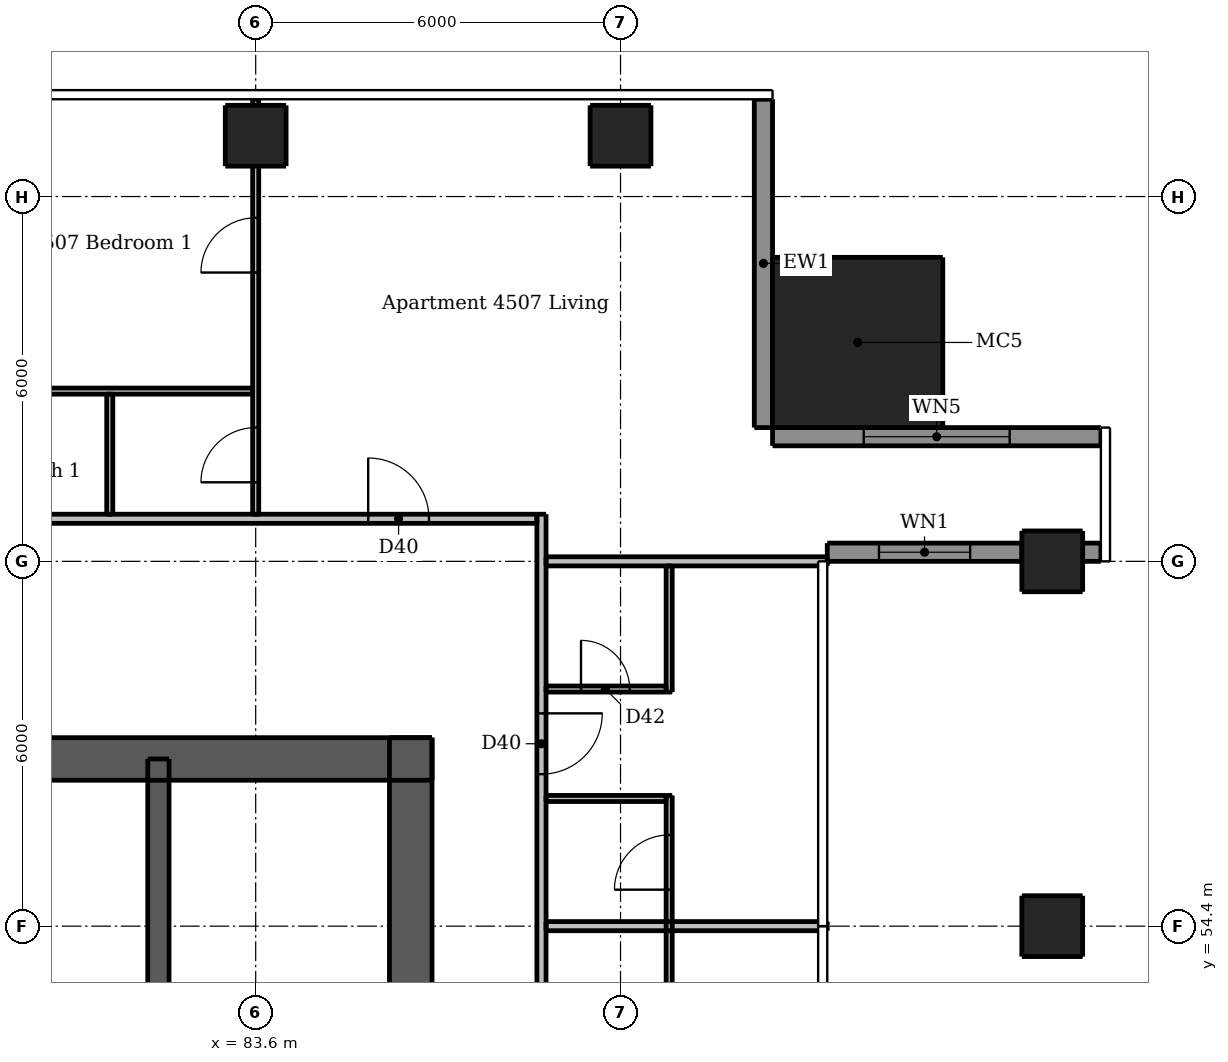
"""IFC4 building model, lengths in metres.
Left out: names, types, materials, properties, quantities, classifications, styles, units other than length and angle.
Written with IfcOpenShell. Run it as: python <this file> out.ifc"""

import sys

from ifc_helpers import new_model, si_unit, direction, frame, frame_2d, origin, origin_2d, place, context, subcontext, project, spatial, rectangle, extrude, element, fill, save


model = new_model("IFC4")
c1 = context("Model", 3, precision=1e-05, world=origin(), true_north=direction((0.0, 1.0)))
c2 = subcontext(c1, "Body", "Model", "MODEL_VIEW")
j1 = project(units=[si_unit("LENGTHUNIT", "METRE"), si_unit("PLANEANGLEUNIT", "RADIAN")], contexts=[c1])
p1 = place(None, origin())
s1 = spatial("IfcSite", under=j1, at=p1, CompositionType="ELEMENT")
p2 = place(p1, origin())
s2 = spatial("IfcBuilding", under=s1, at=p2, CompositionType="ELEMENT")
p3 = place(p2, frame((0.0, 0.0, 168.1)))
s3 = spatial("IfcBuildingStorey", under=s2, at=p3, CompositionType="ELEMENT", Elevation=168.1)
p4 = place(p3, frame((62.5, 57.15, 0.0), z_axis=(0.0, 0.0, 1.0), x_axis=(1.0, 0.0, 0.0)))
e1 = element("IfcWall", 1, at=p4, inside=s3, PredefinedType="SHEAR", context=c2, shape_type="SweptSolid", body=[
    extrude(rectangle(XDim=24.0, YDim=0.7, at=frame_2d((12.0, 0.0))), origin(), (0.0, 0.0, 1.0), 3.05),
])
p5 = place(p4, frame((20.938, 0.0, 0.0)))
e2 = element("IfcOpeningElement", 2, at=p5, cuts=e1, PredefinedType="OPENING", context=c2, shape_type="SweptSolid", body=[
    extrude(rectangle(XDim=1.1, YDim=2.1, at=frame_2d((0.55, 1.05))), frame((0.0, 0.36, 0.0), z_axis=(0.0, -1.0, 0.0), x_axis=(1.0, 0.0, 0.0)), (0.0, 0.0, 1.0), 0.72),
])
p6 = place(p4, frame((1.962, 0.0, 0.0)))
e3 = element("IfcOpeningElement", 3, at=p6, cuts=e1, PredefinedType="OPENING", context=c2, shape_type="SweptSolid", body=[
    extrude(rectangle(XDim=1.1, YDim=2.1, at=frame_2d((0.55, 1.05))), frame((0.0, 0.36, 0.0), z_axis=(0.0, -1.0, 0.0), x_axis=(1.0, 0.0, 0.0)), (0.0, 0.0, 1.0), 0.72),
])
p7 = place(p4, frame((6.423, 0.0, 0.0)))
e4 = element("IfcOpeningElement", 4, at=p7, cuts=e1, PredefinedType="OPENING", context=c2, shape_type="SweptSolid", body=[
    extrude(rectangle(XDim=0.9, YDim=2.1, at=frame_2d((0.45, 1.05))), frame((0.0, 0.36, 0.0), z_axis=(0.0, -1.0, 0.0), x_axis=(1.0, 0.0, 0.0)), (0.0, 0.0, 1.0), 0.72),
])
p8 = place(p4, frame((13.748, 0.0, 0.0)))
e5 = element("IfcOpeningElement", 5, at=p8, cuts=e1, PredefinedType="OPENING", context=c2, shape_type="SweptSolid", body=[
    extrude(rectangle(XDim=0.9, YDim=2.1, at=frame_2d((0.45, 1.05))), frame((0.0, 0.36, 0.0), z_axis=(0.0, -1.0, 0.0), x_axis=(1.0, 0.0, 0.0)), (0.0, 0.0, 1.0), 0.72),
])
p9 = place(p3, frame((86.15, 33.5, 0.0), z_axis=(0.0, 0.0, 1.0), x_axis=(0.0, 1.0, 0.0)))
e6 = element("IfcWall", 6, at=p9, inside=s3, PredefinedType="SHEAR", context=c2, shape_type="SweptSolid", body=[
    extrude(rectangle(XDim=24.0, YDim=0.7, at=frame_2d((12.0, 0.0))), origin(), (0.0, 0.0, 1.0), 3.05),
])
p10 = place(p9, frame((11.2, 0.0, 0.0)))
e7 = element("IfcOpeningElement", 7, at=p10, cuts=e6, PredefinedType="OPENING", context=c2, shape_type="SweptSolid", body=[
    extrude(rectangle(XDim=1.6, YDim=2.1, at=frame_2d((0.8, 1.05))), frame((0.0, 0.36, 0.0), z_axis=(0.0, -1.0, 0.0), x_axis=(1.0, 0.0, 0.0)), (0.0, 0.0, 1.0), 0.72),
])
p11 = place(p3, frame((82.0, 47.1, 0.0), z_axis=(0.0, 0.0, 1.0), x_axis=(0.0, 1.0, 0.0)))
e8 = element("IfcWall", 8, at=p11, inside=s3, PredefinedType="SHEAR", context=c2, shape_type="SweptSolid", body=[
    extrude(rectangle(XDim=10.05, YDim=0.35, at=frame_2d((5.025, 0.0))), origin(), (0.0, 0.0, 1.0), 3.05),
])
for number, where, z_axis, x_axis in (
    (9, (96.7, 54.4, 0.0), (0.0, 0.0, 1.0), (1.0, 0.0, 0.0)),
    (10, (96.7, 60.4, 0.0), (0.0, 0.0, 1.0), (1.0, 0.0, 0.0)),
    (11, (83.6, 67.4, 0.0), (0.0, 0.0, 1.0), (1.0, 0.0, 0.0)),
    (12, (89.6, 67.4, 0.0), (0.0, 0.0, 1.0), (1.0, 0.0, 0.0)),
):
    element("IfcColumn", number, at=place(p3, frame(where, z_axis=z_axis, x_axis=x_axis)), inside=s3, PredefinedType="COLUMN", context=c2, shape_type="SweptSolid", body=[
        extrude(rectangle(XDim=1.0, YDim=1.0, at=origin_2d()), origin(), (0.0, 0.0, 1.0), 3.05),
    ])
p12 = place(p3, frame((93.5, 64.0, 0.0), z_axis=(0.0, 0.0, 1.0), x_axis=(1.0, 0.0, 0.0)))
e13 = element("IfcColumn", 13, at=p12, inside=s3, PredefinedType="COLUMN", context=c2, shape_type="SweptSolid", body=[
    extrude(rectangle(XDim=2.8, YDim=2.8, at=origin_2d()), origin(), (0.0, 0.0, 1.0), 3.3),
])
p13 = place(p3, frame((93.0, 60.55, 0.0), z_axis=(0.0, 0.0, 1.0), x_axis=(1.0, 0.0, 0.0)))
e14 = element("IfcWall", 14, at=p13, inside=s3, PredefinedType="SOLIDWALL", context=c2, shape_type="SweptSolid", body=[
    extrude(rectangle(XDim=3.2, YDim=0.3, at=frame_2d((1.6, 0.0))), origin(), (0.0, 0.0, 1.0), 3.05),
])
p14 = place(p13, frame((0.85, 0.0, 0.9)))
e15 = element("IfcOpeningElement", 15, at=p14, cuts=e14, PredefinedType="OPENING", context=c2, shape_type="SweptSolid", body=[
    extrude(rectangle(XDim=1.5, YDim=1.5, at=frame_2d((0.75, 0.75))), frame((0.0, 0.16, 0.0), z_axis=(0.0, -1.0, 0.0), x_axis=(1.0, 0.0, 0.0)), (0.0, 0.0, 1.0), 0.32),
])
p15 = place(p3, frame((97.2, 60.55, 0.0), z_axis=(0.0, 0.0, 1.0), x_axis=(1.0, 0.0, 0.0)))
e16 = element("IfcWall", 16, at=p15, inside=s3, PredefinedType="SOLIDWALL", context=c2, shape_type="SweptSolid", body=[
    extrude(rectangle(XDim=0.3, YDim=0.3, at=frame_2d((0.15, 0.0))), origin(), (0.0, 0.0, 1.0), 3.05),
])
p16 = place(p3, frame((97.5, 62.45, 0.0), z_axis=(0.0, 0.0, 1.0), x_axis=(-1.0, 0.0, 0.0)))
e17 = element("IfcWall", 17, at=p16, inside=s3, PredefinedType="SOLIDWALL", context=c2, shape_type="SweptSolid", body=[
    extrude(rectangle(XDim=5.4, YDim=0.3, at=frame_2d((2.7, 0.0))), origin(), (0.0, 0.0, 1.0), 3.05),
])
p17 = place(p16, frame((1.5, 0.0, 0.15)))
e18 = element("IfcOpeningElement", 18, at=p17, cuts=e17, PredefinedType="OPENING", context=c2, shape_type="SweptSolid", body=[
    extrude(rectangle(XDim=2.4, YDim=2.1, at=frame_2d((1.2, 1.05))), frame((0.0, 0.16, 0.0), z_axis=(0.0, -1.0, 0.0), x_axis=(1.0, 0.0, 0.0)), (0.0, 0.0, 1.0), 0.32),
])
p18 = place(p3, frame((91.95, 62.6, 0.0), z_axis=(0.0, 0.0, 1.0), x_axis=(0.0, 1.0, 0.0)))
e19 = element("IfcWall", 19, at=p18, inside=s3, PredefinedType="SOLIDWALL", context=c2, shape_type="SweptSolid", body=[
    extrude(rectangle(XDim=5.4, YDim=0.3, at=frame_2d((2.7, 0.0))), origin(), (0.0, 0.0, 1.0), 3.05),
])
p19 = place(p3, frame((81.2, 61.175, 0.0), z_axis=(0.0, 0.0, 1.0), x_axis=(0.0, 1.0, 0.0)))
e20 = element("IfcWall", 20, at=p19, inside=s3, PredefinedType="PARTITIONING", context=c2, shape_type="SweptSolid", body=[
    extrude(rectangle(XDim=1.975, YDim=0.1, at=frame_2d((0.987, 0.0))), origin(), (0.0, 0.0, 1.0), 3.05),
])
p20 = place(p3, frame((83.6, 61.175, 0.0), z_axis=(0.0, 0.0, 1.0), x_axis=(0.0, 1.0, 0.0)))
e21 = element("IfcWall", 21, at=p20, inside=s3, PredefinedType="PARTITIONING", context=c2, shape_type="SweptSolid", body=[
    extrude(rectangle(XDim=6.825, YDim=0.1, at=frame_2d((3.413, 0.0))), origin(), (0.0, 0.0, 1.0), 2.516),
])
p21 = place(p20, frame((0.525, 0.0, 0.0)))
e22 = element("IfcOpeningElement", 22, at=p21, cuts=e21, PredefinedType="OPENING", context=c2, shape_type="SweptSolid", body=[
    extrude(rectangle(XDim=0.9, YDim=2.1, at=frame_2d((0.45, 1.05))), frame((0.0, 0.06, 0.0), z_axis=(0.0, -1.0, 0.0), x_axis=(1.0, 0.0, 0.0)), (0.0, 0.0, 1.0), 0.12),
])
p22 = place(p20, frame((3.975, 0.0, 0.0)))
e23 = element("IfcOpeningElement", 23, at=p22, cuts=e21, PredefinedType="OPENING", context=c2, shape_type="SweptSolid", body=[
    extrude(rectangle(XDim=0.9, YDim=2.1, at=frame_2d((0.45, 1.05))), frame((0.0, 0.06, 0.0), z_axis=(0.0, -1.0, 0.0), x_axis=(1.0, 0.0, 0.0)), (0.0, 0.0, 1.0), 0.12),
])
p23 = place(p3, frame((90.4, 51.45, 0.0), z_axis=(0.0, 0.0, 1.0), x_axis=(0.0, 1.0, 0.0)))
e24 = element("IfcWall", 24, at=p23, inside=s3, PredefinedType="PARTITIONING", context=c2, shape_type="SweptSolid", body=[
    extrude(rectangle(XDim=5.1, YDim=0.1, at=frame_2d((2.55, 0.0))), origin(), (0.0, 0.0, 1.0), 3.05),
])
p24 = place(p23, frame((3.55, 0.0, 0.0)))
e25 = element("IfcOpeningElement", 25, at=p24, cuts=e24, PredefinedType="OPENING", context=c2, shape_type="SweptSolid", body=[
    extrude(rectangle(XDim=0.9, YDim=2.1, at=frame_2d((0.45, 1.05))), frame((0.0, 0.06, 0.0), z_axis=(0.0, -1.0, 0.0), x_axis=(1.0, 0.0, 0.0)), (0.0, 0.0, 1.0), 0.12),
])
p25 = place(p3, frame((90.4, 58.25, 0.0), z_axis=(0.0, 0.0, 1.0), x_axis=(0.0, 1.0, 0.0)))
e26 = element("IfcWall", 26, at=p25, inside=s3, PredefinedType="PARTITIONING", context=c2, shape_type="SweptSolid", body=[
    extrude(rectangle(XDim=2.075, YDim=0.1, at=frame_2d((1.038, 0.0))), origin(), (0.0, 0.0, 1.0), 3.05),
])
p26 = place(p3, frame((83.55, 63.2, 0.0), z_axis=(0.0, 0.0, 1.0), x_axis=(-1.0, 0.0, 0.0)))
e27 = element("IfcWall", 27, at=p26, inside=s3, PredefinedType="PARTITIONING", context=c2, shape_type="SweptSolid", body=[
    extrude(rectangle(XDim=5.875, YDim=0.1, at=frame_2d((2.938, 0.0))), origin(), (0.0, 0.0, 1.0), 3.05),
])
p27 = place(p26, frame((3.75, 0.0, 0.0)))
e28 = element("IfcOpeningElement", 28, at=p27, cuts=e27, PredefinedType="OPENING", context=c2, shape_type="SweptSolid", body=[
    extrude(rectangle(XDim=0.8, YDim=2.1, at=frame_2d((0.4, 1.05))), frame((0.0, 0.06, 0.0), z_axis=(0.0, -1.0, 0.0), x_axis=(1.0, 0.0, 0.0)), (0.0, 0.0, 1.0), 0.12),
])
p28 = place(p3, frame((88.375, 58.3, 0.0), z_axis=(0.0, 0.0, 1.0), x_axis=(1.0, 0.0, 0.0)))
e29 = element("IfcWall", 29, at=p28, inside=s3, PredefinedType="PARTITIONING", context=c2, shape_type="SweptSolid", body=[
    extrude(rectangle(XDim=1.975, YDim=0.1, at=frame_2d((0.988, 0.0))), origin(), (0.0, 0.0, 1.0), 3.05),
])
p29 = place(p28, frame((0.575, 0.0, 0.0)))
e30 = element("IfcOpeningElement", 30, at=p29, cuts=e29, PredefinedType="OPENING", context=c2, shape_type="SweptSolid", body=[
    extrude(rectangle(XDim=0.8, YDim=2.1, at=frame_2d((0.4, 1.05))), frame((0.0, 0.06, 0.0), z_axis=(0.0, -1.0, 0.0), x_axis=(1.0, 0.0, 0.0)), (0.0, 0.0, 1.0), 0.12),
])
p30 = place(p3, frame((88.375, 56.5, 0.0), z_axis=(0.0, 0.0, 1.0), x_axis=(1.0, 0.0, 0.0)))
e31 = element("IfcWall", 31, at=p30, inside=s3, PredefinedType="PARTITIONING", context=c2, shape_type="SweptSolid", body=[
    extrude(rectangle(XDim=1.975, YDim=0.1, at=frame_2d((0.988, 0.0))), origin(), (0.0, 0.0, 1.0), 3.05),
])
p31 = place(p3, frame((88.3, 61.175, 0.0), z_axis=(0.0, 0.0, 1.0), x_axis=(0.0, -1.0, 0.0)))
e32 = element("IfcWall", 32, at=p31, inside=s3, PredefinedType="PARTITIONING", context=c2, shape_type="SweptSolid", body=[
    extrude(rectangle(XDim=29.4, YDim=0.15, at=frame_2d((14.7, 0.0))), origin(), (0.0, 0.0, 1.0), 3.05),
])
p32 = place(p31, frame((28.125, 0.0, 0.0)))
e33 = element("IfcOpeningElement", 33, at=p32, cuts=e32, PredefinedType="OPENING", context=c2, shape_type="SweptSolid", body=[
    extrude(rectangle(XDim=1.0, YDim=2.1, at=frame_2d((0.5, 1.05))), frame((0.0, 0.085, 0.0), z_axis=(0.0, -1.0, 0.0), x_axis=(1.0, 0.0, 0.0)), (0.0, 0.0, 1.0), 0.17),
])
p33 = place(p31, frame((13.775, 0.0, 0.0)))
e34 = element("IfcOpeningElement", 34, at=p33, cuts=e32, PredefinedType="OPENING", context=c2, shape_type="SweptSolid", body=[
    extrude(rectangle(XDim=1.0, YDim=2.1, at=frame_2d((0.5, 1.05))), frame((0.0, 0.085, 0.0), z_axis=(0.0, -1.0, 0.0), x_axis=(1.0, 0.0, 0.0)), (0.0, 0.0, 1.0), 0.17),
])
p34 = place(p31, frame((3.275, 0.0, 0.0)))
e35 = element("IfcOpeningElement", 35, at=p34, cuts=e32, PredefinedType="OPENING", context=c2, shape_type="SweptSolid", body=[
    extrude(rectangle(XDim=1.0, YDim=2.1, at=frame_2d((0.5, 1.05))), frame((0.0, 0.085, 0.0), z_axis=(0.0, -1.0, 0.0), x_axis=(1.0, 0.0, 0.0)), (0.0, 0.0, 1.0), 0.17),
])
p35 = place(p3, frame((58.975, 61.1, 0.0), z_axis=(0.0, 0.0, 1.0), x_axis=(1.0, 0.0, 0.0)))
e36 = element("IfcWall", 36, at=p35, inside=s3, PredefinedType="PARTITIONING", context=c2, shape_type="SweptSolid", body=[
    extrude(rectangle(XDim=29.25, YDim=0.15, at=frame_2d((14.625, 0.0))), origin(), (0.0, 0.0, 1.0), 3.05),
])
p36 = place(p35, frame((9.125, 0.0, 0.0)))
e37 = element("IfcOpeningElement", 37, at=p36, cuts=e36, PredefinedType="OPENING", context=c2, shape_type="SweptSolid", body=[
    extrude(rectangle(XDim=1.0, YDim=2.1, at=frame_2d((0.5, 1.05))), frame((0.0, 0.085, 0.0), z_axis=(0.0, -1.0, 0.0), x_axis=(1.0, 0.0, 0.0)), (0.0, 0.0, 1.0), 0.17),
])
p37 = place(p35, frame((26.475, 0.0, 0.0)))
e38 = element("IfcOpeningElement", 38, at=p37, cuts=e36, PredefinedType="OPENING", context=c2, shape_type="SweptSolid", body=[
    extrude(rectangle(XDim=1.0, YDim=2.1, at=frame_2d((0.5, 1.05))), frame((0.0, 0.085, 0.0), z_axis=(0.0, -1.0, 0.0), x_axis=(1.0, 0.0, 0.0)), (0.0, 0.0, 1.0), 0.17),
])
p38 = place(p3, frame((88.375, 60.4, 0.0), z_axis=(0.0, 0.0, 1.0), x_axis=(1.0, 0.0, 0.0)))
e39 = element("IfcWall", 39, at=p38, inside=s3, PredefinedType="PARTITIONING", context=c2, shape_type="SweptSolid", body=[
    extrude(rectangle(XDim=4.625, YDim=0.15, at=frame_2d((2.312, 0.0))), origin(), (0.0, 0.0, 1.0), 2.647),
])
p39 = place(p3, frame((88.375, 54.4, 0.0), z_axis=(0.0, 0.0, 1.0), x_axis=(1.0, 0.0, 0.0)))
e40 = element("IfcWall", 40, at=p39, inside=s3, PredefinedType="PARTITIONING", context=c2, shape_type="SweptSolid", body=[
    extrude(rectangle(XDim=4.625, YDim=0.15, at=frame_2d((2.312, 0.0))), origin(), (0.0, 0.0, 1.0), 2.516),
])
p40 = place(p14, origin())
e41 = element("IfcWindow", 41, at=p40, inside=s3, PartitioningType="DOUBLE_PANEL_VERTICAL", PredefinedType="WINDOW", context=c2, shape_type="SweptSolid", body=[
    extrude(rectangle(XDim=1.5, YDim=1.5, at=frame_2d((0.75, 0.75))), frame((0.0, 0.03, 0.0), z_axis=(0.0, -1.0, 0.0), x_axis=(1.0, 0.0, 0.0)), (0.0, 0.0, 1.0), 0.06),
])
fill(e15, e41)
p41 = place(p17, origin())
e42 = element("IfcWindow", 42, at=p41, inside=s3, PartitioningType="DOUBLE_PANEL_VERTICAL", PredefinedType="WINDOW", context=c2, shape_type="SweptSolid", body=[
    extrude(rectangle(XDim=2.4, YDim=2.1, at=frame_2d((1.2, 1.05))), frame((0.0, 0.03, 0.0), z_axis=(0.0, -1.0, 0.0), x_axis=(1.0, 0.0, 0.0)), (0.0, 0.0, 1.0), 0.06),
])
fill(e18, e42)
p42 = place(p5, origin())
e43 = element("IfcDoor", 43, at=p42, inside=s3, OperationType="SINGLE_SWING_RIGHT", PredefinedType="DOOR", context=c2, shape_type="SweptSolid", body=[
    extrude(rectangle(XDim=1.1, YDim=2.1, at=frame_2d((0.55, 1.05))), frame((0.0, -0.288, 0.0), z_axis=(0.0, -1.0, 0.0), x_axis=(1.0, 0.0, 0.0)), (0.0, 0.0, 1.0), 0.05),
])
fill(e2, e43)
p43 = place(p34, origin())
e44 = element("IfcDoor", 44, at=p43, inside=s3, OperationType="SINGLE_SWING_LEFT", PredefinedType="DOOR", context=c2, shape_type="SweptSolid", body=[
    extrude(rectangle(XDim=1.0, YDim=2.1, at=frame_2d((0.5, 1.05))), frame((0.0, 0.025, 0.0), z_axis=(0.0, -1.0, 0.0), x_axis=(1.0, 0.0, 0.0)), (0.0, 0.0, 1.0), 0.05),
])
fill(e35, e44)
p44 = place(p24, origin())
e45 = element("IfcDoor", 45, at=p44, inside=s3, OperationType="SINGLE_SWING_LEFT", PredefinedType="DOOR", context=c2, shape_type="SweptSolid", body=[
    extrude(rectangle(XDim=0.9, YDim=2.1, at=frame_2d((0.45, 1.05))), frame((0.0, 0.025, 0.0), z_axis=(0.0, -1.0, 0.0), x_axis=(1.0, 0.0, 0.0)), (0.0, 0.0, 1.0), 0.05),
])
fill(e25, e45)
p45 = place(p29, origin())
e46 = element("IfcDoor", 46, at=p45, inside=s3, OperationType="SINGLE_SWING_LEFT", PredefinedType="DOOR", context=c2, shape_type="SweptSolid", body=[
    extrude(rectangle(XDim=0.8, YDim=2.1, at=frame_2d((0.4, 1.05))), frame((0.0, 0.025, 0.0), z_axis=(0.0, -1.0, 0.0), x_axis=(1.0, 0.0, 0.0)), (0.0, 0.0, 1.0), 0.05),
])
fill(e30, e46)
p46 = place(p37, origin())
e47 = element("IfcDoor", 47, at=p46, inside=s3, OperationType="SINGLE_SWING_LEFT", PredefinedType="DOOR", context=c2, shape_type="SweptSolid", body=[
    extrude(rectangle(XDim=1.0, YDim=2.1, at=frame_2d((0.5, 1.05))), frame((0.0, 0.025, 0.0), z_axis=(0.0, -1.0, 0.0), x_axis=(1.0, 0.0, 0.0)), (0.0, 0.0, 1.0), 0.05),
])
fill(e38, e47)
p47 = place(p21, origin())
e48 = element("IfcDoor", 48, at=p47, inside=s3, OperationType="SINGLE_SWING_LEFT", PredefinedType="DOOR", context=c2, shape_type="SweptSolid", body=[
    extrude(rectangle(XDim=0.9, YDim=2.1, at=frame_2d((0.45, 1.05))), frame((0.0, 0.025, 0.0), z_axis=(0.0, -1.0, 0.0), x_axis=(1.0, 0.0, 0.0)), (0.0, 0.0, 1.0), 0.05),
])
fill(e22, e48)
p48 = place(p22, origin())
e49 = element("IfcDoor", 49, at=p48, inside=s3, OperationType="SINGLE_SWING_LEFT", PredefinedType="DOOR", context=c2, shape_type="SweptSolid", body=[
    extrude(rectangle(XDim=0.9, YDim=2.1, at=frame_2d((0.45, 1.05))), frame((0.0, 0.025, 0.0), z_axis=(0.0, -1.0, 0.0), x_axis=(1.0, 0.0, 0.0)), (0.0, 0.0, 1.0), 0.05),
])
fill(e23, e49)
save(model, sys.argv[1])
